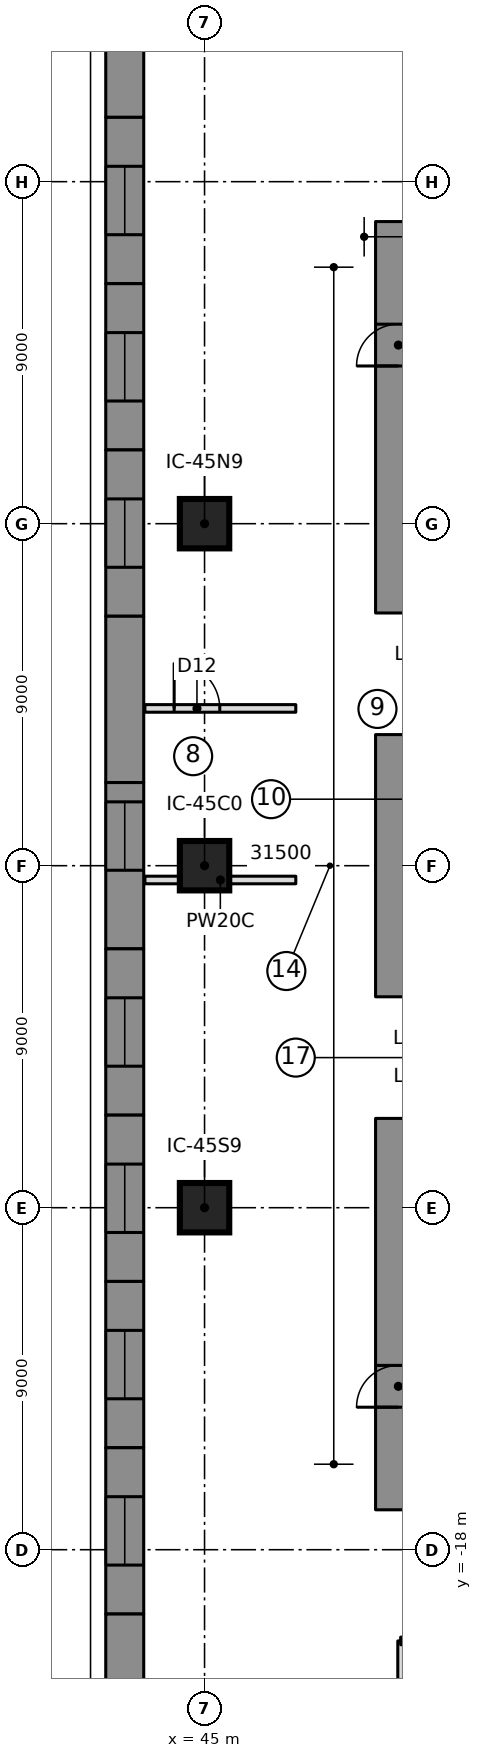
"""IFC4 building model, lengths in metres.
Left out: names, types, materials, properties, quantities, classifications, styles, units other than length and angle.
Written with IfcOpenShell. Run it as: python <this file> out.ifc"""

import sys

from ifc_helpers import new_model, si_unit, direction, frame, frame_2d, origin, origin_2d, place, context, subcontext, project, spatial, polyline, rectangle, outline, extrude, element, fill, save


model = new_model("IFC4")
c1 = context("Model", 3, precision=1e-05, world=origin(), true_north=direction((0.0, 1.0)))
c2 = subcontext(c1, "Body", "Model", "MODEL_VIEW")
j1 = project(units=[si_unit("LENGTHUNIT", "METRE"), si_unit("PLANEANGLEUNIT", "RADIAN")], contexts=[c1])
p1 = place(None, origin())
s1 = spatial("IfcSite", under=j1, at=p1, CompositionType="ELEMENT")
p2 = place(p1, origin())
s2 = spatial("IfcBuilding", under=s1, at=p2, CompositionType="ELEMENT")
p3 = place(p2, frame((0.0, 0.0, 13.5)))
s3 = spatial("IfcBuildingStorey", under=s2, at=p3, CompositionType="ELEMENT", Elevation=13.5)
p4 = place(p3, frame((50.1, 6.65, 0.0), z_axis=(0.0, 0.0, 1.0), x_axis=(0.0, 1.0, 0.0)))
e1 = element("IfcWall", 1, at=p4, inside=s3, PredefinedType="SHEAR", context=c2, shape_type="SweptSolid", body=[
    extrude(rectangle(XDim=10.3, YDim=1.2, at=frame_2d((5.15, 0.0))), origin(), (0.0, 0.0, 1.0), 5.5),
])
p5 = place(p4, frame((6.5, 0.0, 0.0)))
e2 = element("IfcOpeningElement", 2, at=p5, cuts=e1, PredefinedType="OPENING", context=c2, shape_type="SweptSolid", body=[
    extrude(rectangle(XDim=1.1, YDim=2.1, at=frame_2d((0.55, 1.05))), frame((0.0, 0.61, 0.0), z_axis=(0.0, -1.0, 0.0), x_axis=(1.0, 0.0, 0.0)), (0.0, 0.0, 1.0), 1.22),
])
p6 = place(p3, frame((50.1, -3.45, 0.0), z_axis=(0.0, 0.0, 1.0), x_axis=(0.0, 1.0, 0.0)))
e3 = element("IfcWall", 3, at=p6, inside=s3, PredefinedType="SHEAR", context=c2, shape_type="SweptSolid", body=[
    extrude(rectangle(XDim=6.9, YDim=1.2, at=frame_2d((3.45, 0.0))), origin(), (0.0, 0.0, 1.0), 5.5),
])
p7 = place(p3, frame((50.1, -16.95, 0.0), z_axis=(0.0, 0.0, 1.0), x_axis=(0.0, 1.0, 0.0)))
e4 = element("IfcWall", 4, at=p7, inside=s3, PredefinedType="SHEAR", context=c2, shape_type="SweptSolid", body=[
    extrude(rectangle(XDim=10.3, YDim=1.2, at=frame_2d((5.15, 0.0))), origin(), (0.0, 0.0, 1.0), 5.5),
])
p8 = place(p7, frame((2.7, 0.0, 0.0)))
e5 = element("IfcOpeningElement", 5, at=p8, cuts=e4, PredefinedType="OPENING", context=c2, shape_type="SweptSolid", body=[
    extrude(rectangle(XDim=1.1, YDim=2.1, at=frame_2d((0.55, 1.05))), frame((0.0, 0.61, 0.0), z_axis=(0.0, -1.0, 0.0), x_axis=(1.0, 0.0, 0.0)), (0.0, 0.0, 1.0), 1.22),
])
for number, where, z_axis, x_axis in (
    (6, (45.0, -9.0, 0.0), (0.0, 0.0, 1.0), (1.0, 0.0, 0.0)),
    (7, (45.0, 0.0, 0.0), (0.0, 0.0, 1.0), (1.0, 0.0, 0.0)),
    (8, (45.0, 9.0, 0.0), (0.0, 0.0, 1.0), (1.0, 0.0, 0.0)),
):
    element("IfcColumn", number, at=place(p3, frame(where, z_axis=z_axis, x_axis=x_axis)), inside=s3, PredefinedType="COLUMN", context=c2, shape_type="SweptSolid", body=[
        extrude(rectangle(XDim=1.3, YDim=1.3, at=origin_2d()), origin(), (0.0, 0.0, 1.0), 5.5),
    ])
p9 = place(p3, frame((42.9, 24.069, 0.0), z_axis=(0.0, 0.0, 1.0), x_axis=(0.0, -1.0, 0.0)))
e9 = element("IfcWall", 9, at=p9, inside=s3, PredefinedType="NOTDEFINED", context=c2, shape_type="SweptSolid", body=[
    extrude(outline(polyline([(0.0, -0.5), (4.376, -0.5), (4.376, 0.5), (0.0, 0.5), (0.0, -0.5)])), origin(), (0.0, 0.0, 1.0), 5.2),
])
p10 = place(p3, frame((42.9, 19.693, 0.0), z_axis=(0.0, 0.0, 1.0), x_axis=(0.0, -1.0, 0.0)))
e10 = element("IfcWall", 10, at=p10, inside=s3, PredefinedType="NOTDEFINED", context=c2, shape_type="SweptSolid", body=[
    extrude(outline(polyline([(0.0, -0.5), (4.376, -0.5), (4.376, 0.5), (0.0, 0.5), (0.0, -0.5)])), origin(), (0.0, 0.0, 1.0), 5.2),
])
p11 = place(p10, frame((1.288, 0.0, 0.9)))
e11 = element("IfcOpeningElement", 11, at=p11, cuts=e10, PredefinedType="OPENING", context=c2, shape_type="SweptSolid", body=[
    extrude(rectangle(XDim=1.8, YDim=2.4, at=frame_2d((0.9, 1.2))), frame((0.0, 0.51, 0.0), z_axis=(0.0, -1.0, 0.0), x_axis=(1.0, 0.0, 0.0)), (0.0, 0.0, 1.0), 1.02),
])
p12 = place(p3, frame((42.9, 15.316, 0.0), z_axis=(0.0, 0.0, 1.0), x_axis=(0.0, -1.0, 0.0)))
e12 = element("IfcWall", 12, at=p12, inside=s3, PredefinedType="NOTDEFINED", context=c2, shape_type="SweptSolid", body=[
    extrude(outline(polyline([(0.0, -0.5), (4.376, -0.5), (4.376, 0.5), (0.0, 0.5), (0.0, -0.5)])), origin(), (0.0, 0.0, 1.0), 5.2),
])
p13 = place(p12, frame((1.288, 0.0, 0.9)))
e13 = element("IfcOpeningElement", 13, at=p13, cuts=e12, PredefinedType="OPENING", context=c2, shape_type="SweptSolid", body=[
    extrude(rectangle(XDim=1.8, YDim=2.4, at=frame_2d((0.9, 1.2))), frame((0.0, 0.51, 0.0), z_axis=(0.0, -1.0, 0.0), x_axis=(1.0, 0.0, 0.0)), (0.0, 0.0, 1.0), 1.02),
])
p14 = place(p3, frame((42.9, 10.94, 0.0), z_axis=(0.0, 0.0, 1.0), x_axis=(0.0, -1.0, 0.0)))
e14 = element("IfcWall", 14, at=p14, inside=s3, PredefinedType="NOTDEFINED", context=c2, shape_type="SweptSolid", body=[
    extrude(outline(polyline([(0.0, -0.5), (4.376, -0.5), (4.376, 0.5), (0.0, 0.5), (0.0, -0.5)])), origin(), (0.0, 0.0, 1.0), 5.2),
])
p15 = place(p14, frame((1.288, 0.0, 0.9)))
e15 = element("IfcOpeningElement", 15, at=p15, cuts=e14, PredefinedType="OPENING", context=c2, shape_type="SweptSolid", body=[
    extrude(rectangle(XDim=1.8, YDim=2.4, at=frame_2d((0.9, 1.2))), frame((0.0, 0.51, 0.0), z_axis=(0.0, -1.0, 0.0), x_axis=(1.0, 0.0, 0.0)), (0.0, 0.0, 1.0), 1.02),
])
p16 = place(p3, frame((42.9, 6.564, 0.0), z_axis=(0.0, 0.0, 1.0), x_axis=(0.0, -1.0, 0.0)))
e16 = element("IfcWall", 16, at=p16, inside=s3, PredefinedType="NOTDEFINED", context=c2, shape_type="SweptSolid", body=[
    extrude(outline(polyline([(0.0, -0.5), (4.376, -0.5), (4.376, 0.5), (0.0, 0.5), (0.0, -0.5)])), origin(), (0.0, 0.0, 1.0), 5.2),
])
p17 = place(p3, frame((42.9, 2.188, 0.0), z_axis=(0.0, 0.0, 1.0), x_axis=(0.0, -1.0, 0.0)))
e17 = element("IfcWall", 17, at=p17, inside=s3, PredefinedType="NOTDEFINED", context=c2, shape_type="SweptSolid", body=[
    extrude(outline(polyline([(0.0, -0.5), (4.376, -0.5), (4.376, 0.5), (0.0, 0.5), (0.0, -0.5)])), origin(), (0.0, 0.0, 1.0), 5.2),
])
p18 = place(p17, frame((0.508, 0.0, 0.9)))
e18 = element("IfcOpeningElement", 18, at=p18, cuts=e17, PredefinedType="OPENING", context=c2, shape_type="SweptSolid", body=[
    extrude(rectangle(XDim=1.8, YDim=2.4, at=frame_2d((0.9, 1.2))), frame((0.0, 0.51, 0.0), z_axis=(0.0, -1.0, 0.0), x_axis=(1.0, 0.0, 0.0)), (0.0, 0.0, 1.0), 1.02),
])
p19 = place(p3, frame((42.9, -2.188, 0.0), z_axis=(0.0, 0.0, 1.0), x_axis=(0.0, -1.0, 0.0)))
e19 = element("IfcWall", 19, at=p19, inside=s3, PredefinedType="NOTDEFINED", context=c2, shape_type="SweptSolid", body=[
    extrude(outline(polyline([(0.0, -0.5), (4.376, -0.5), (4.376, 0.5), (0.0, 0.5), (0.0, -0.5)])), origin(), (0.0, 0.0, 1.0), 5.2),
])
p20 = place(p19, frame((1.288, 0.0, 0.9)))
e20 = element("IfcOpeningElement", 20, at=p20, cuts=e19, PredefinedType="OPENING", context=c2, shape_type="SweptSolid", body=[
    extrude(rectangle(XDim=1.8, YDim=2.4, at=frame_2d((0.9, 1.2))), frame((0.0, 0.51, 0.0), z_axis=(0.0, -1.0, 0.0), x_axis=(1.0, 0.0, 0.0)), (0.0, 0.0, 1.0), 1.02),
])
p21 = place(p3, frame((42.9, -6.564, 0.0), z_axis=(0.0, 0.0, 1.0), x_axis=(0.0, -1.0, 0.0)))
e21 = element("IfcWall", 21, at=p21, inside=s3, PredefinedType="NOTDEFINED", context=c2, shape_type="SweptSolid", body=[
    extrude(outline(polyline([(0.0, -0.5), (4.376, -0.5), (4.376, 0.5), (0.0, 0.5), (0.0, -0.5)])), origin(), (0.0, 0.0, 1.0), 5.2),
])
p22 = place(p21, frame((1.288, 0.0, 0.9)))
e22 = element("IfcOpeningElement", 22, at=p22, cuts=e21, PredefinedType="OPENING", context=c2, shape_type="SweptSolid", body=[
    extrude(rectangle(XDim=1.8, YDim=2.4, at=frame_2d((0.9, 1.2))), frame((0.0, 0.51, 0.0), z_axis=(0.0, -1.0, 0.0), x_axis=(1.0, 0.0, 0.0)), (0.0, 0.0, 1.0), 1.02),
])
p23 = place(p3, frame((42.9, -10.94, 0.0), z_axis=(0.0, 0.0, 1.0), x_axis=(0.0, -1.0, 0.0)))
e23 = element("IfcWall", 23, at=p23, inside=s3, PredefinedType="NOTDEFINED", context=c2, shape_type="SweptSolid", body=[
    extrude(outline(polyline([(0.0, -0.5), (4.376, -0.5), (4.376, 0.5), (0.0, 0.5), (0.0, -0.5)])), origin(), (0.0, 0.0, 1.0), 5.2),
])
p24 = place(p23, frame((1.288, 0.0, 0.9)))
e24 = element("IfcOpeningElement", 24, at=p24, cuts=e23, PredefinedType="OPENING", context=c2, shape_type="SweptSolid", body=[
    extrude(rectangle(XDim=1.8, YDim=2.4, at=frame_2d((0.9, 1.2))), frame((0.0, 0.51, 0.0), z_axis=(0.0, -1.0, 0.0), x_axis=(1.0, 0.0, 0.0)), (0.0, 0.0, 1.0), 1.02),
])
p25 = place(p3, frame((42.9, -15.316, 0.0), z_axis=(0.0, 0.0, 1.0), x_axis=(0.0, -1.0, 0.0)))
e25 = element("IfcWall", 25, at=p25, inside=s3, PredefinedType="NOTDEFINED", context=c2, shape_type="SweptSolid", body=[
    extrude(outline(polyline([(0.0, -0.5), (4.376, -0.5), (4.376, 0.5), (0.0, 0.5), (0.0, -0.5)])), origin(), (0.0, 0.0, 1.0), 5.2),
])
p26 = place(p25, frame((1.288, 0.0, 0.9)))
e26 = element("IfcOpeningElement", 26, at=p26, cuts=e25, PredefinedType="OPENING", context=c2, shape_type="SweptSolid", body=[
    extrude(rectangle(XDim=1.8, YDim=2.4, at=frame_2d((0.9, 1.2))), frame((0.0, 0.51, 0.0), z_axis=(0.0, -1.0, 0.0), x_axis=(1.0, 0.0, 0.0)), (0.0, 0.0, 1.0), 1.02),
])
p27 = place(p3, frame((42.9, -19.693, 0.0), z_axis=(0.0, 0.0, 1.0), x_axis=(0.0, -1.0, 0.0)))
e27 = element("IfcWall", 27, at=p27, inside=s3, PredefinedType="NOTDEFINED", context=c2, shape_type="SweptSolid", body=[
    extrude(outline(polyline([(0.0, -0.5), (4.376, -0.5), (4.376, 0.5), (0.0, 0.5), (0.0, -0.5)])), origin(), (0.0, 0.0, 1.0), 5.2),
])
p28 = place(p3, frame((43.43, -0.376, 0.0), z_axis=(0.0, 0.0, 1.0), x_axis=(1.0, 0.0, 0.0)))
e28 = element("IfcWall", 28, at=p28, inside=s3, PredefinedType="PARTITIONING", context=c2, shape_type="SweptSolid", body=[
    extrude(rectangle(XDim=3.971, YDim=0.2, at=frame_2d((1.985, 0.0))), origin(), (0.0, 0.0, 1.0), 5.15),
])
p29 = place(p3, frame((50.16, -36.6, 0.0), z_axis=(0.0, 0.0, 1.0), x_axis=(0.0, 1.0, 0.0)))
e29 = element("IfcWall", 29, at=p29, inside=s3, PredefinedType="PARTITIONING", context=c2, shape_type="SweptSolid", body=[
    extrude(rectangle(XDim=16.2, YDim=0.15, at=frame_2d((8.1, 0.0))), origin(), (0.0, 0.0, 1.0), 5.15),
])
p30 = place(p3, frame((43.43, 4.139, 0.0), z_axis=(0.0, 0.0, 1.0), x_axis=(1.0, 0.0, 0.0)))
e30 = element("IfcWall", 30, at=p30, inside=s3, PredefinedType="PARTITIONING", context=c2, shape_type="SweptSolid", body=[
    extrude(rectangle(XDim=3.971, YDim=0.2, at=frame_2d((1.985, 0.0))), origin(), (0.0, 0.0, 1.0), 5.15),
])
p31 = place(p30, frame((0.771, 0.0, 0.0)))
e31 = element("IfcOpeningElement", 31, at=p31, cuts=e30, PredefinedType="OPENING", context=c2, shape_type="SweptSolid", body=[
    extrude(rectangle(XDim=1.2, YDim=2.1, at=frame_2d((0.6, 1.05))), frame((0.0, 0.11, 0.0), z_axis=(0.0, -1.0, 0.0), x_axis=(1.0, 0.0, 0.0)), (0.0, 0.0, 1.0), 0.22),
])
p32 = place(p3, frame((50.16, -20.4, 0.0), z_axis=(0.0, 0.0, 1.0), x_axis=(1.0, 0.0, 0.0)))
e32 = element("IfcWall", 32, at=p32, inside=s3, PredefinedType="PARTITIONING", context=c2, shape_type="SweptSolid", body=[
    extrude(rectangle(XDim=6.12, YDim=0.2, at=frame_2d((3.06, 0.0))), origin(), (0.0, 0.0, 1.0), 5.15),
])
p33 = place(p32, frame((2.56, 0.0, 0.0)))
e33 = element("IfcOpeningElement", 33, at=p33, cuts=e32, PredefinedType="OPENING", context=c2, shape_type="SweptSolid", body=[
    extrude(rectangle(XDim=2.0, YDim=2.4, at=frame_2d((1.0, 1.2))), frame((0.0, 0.11, 0.0), z_axis=(0.0, -1.0, 0.0), x_axis=(1.0, 0.0, 0.0)), (0.0, 0.0, 1.0), 0.22),
])
p34 = place(p11, origin())
e34 = element("IfcWindow", 34, at=p34, inside=s3, PartitioningType="SINGLE_PANEL", PredefinedType="WINDOW", context=c2, shape_type="SweptSolid", body=[
    extrude(rectangle(XDim=1.8, YDim=2.4, at=frame_2d((0.9, 1.2))), frame((0.0, 0.5, 0.0), z_axis=(0.0, -1.0, 0.0), x_axis=(1.0, 0.0, 0.0)), (0.0, 0.0, 1.0), 0.06),
])
fill(e11, e34)
p35 = place(p13, origin())
e35 = element("IfcWindow", 35, at=p35, inside=s3, PartitioningType="SINGLE_PANEL", PredefinedType="WINDOW", context=c2, shape_type="SweptSolid", body=[
    extrude(rectangle(XDim=1.8, YDim=2.4, at=frame_2d((0.9, 1.2))), frame((0.0, 0.5, 0.0), z_axis=(0.0, -1.0, 0.0), x_axis=(1.0, 0.0, 0.0)), (0.0, 0.0, 1.0), 0.06),
])
fill(e13, e35)
p36 = place(p15, origin())
e36 = element("IfcWindow", 36, at=p36, inside=s3, PartitioningType="SINGLE_PANEL", PredefinedType="WINDOW", context=c2, shape_type="SweptSolid", body=[
    extrude(rectangle(XDim=1.8, YDim=2.4, at=frame_2d((0.9, 1.2))), frame((0.0, 0.5, 0.0), z_axis=(0.0, -1.0, 0.0), x_axis=(1.0, 0.0, 0.0)), (0.0, 0.0, 1.0), 0.06),
])
fill(e15, e36)
p37 = place(p18, origin())
e37 = element("IfcWindow", 37, at=p37, inside=s3, PartitioningType="SINGLE_PANEL", PredefinedType="WINDOW", context=c2, shape_type="SweptSolid", body=[
    extrude(rectangle(XDim=1.8, YDim=2.4, at=frame_2d((0.9, 1.2))), frame((0.0, 0.5, 0.0), z_axis=(0.0, -1.0, 0.0), x_axis=(1.0, 0.0, 0.0)), (0.0, 0.0, 1.0), 0.06),
])
fill(e18, e37)
p38 = place(p20, origin())
e38 = element("IfcWindow", 38, at=p38, inside=s3, PartitioningType="SINGLE_PANEL", PredefinedType="WINDOW", context=c2, shape_type="SweptSolid", body=[
    extrude(rectangle(XDim=1.8, YDim=2.4, at=frame_2d((0.9, 1.2))), frame((0.0, 0.5, 0.0), z_axis=(0.0, -1.0, 0.0), x_axis=(1.0, 0.0, 0.0)), (0.0, 0.0, 1.0), 0.06),
])
fill(e20, e38)
p39 = place(p22, origin())
e39 = element("IfcWindow", 39, at=p39, inside=s3, PartitioningType="SINGLE_PANEL", PredefinedType="WINDOW", context=c2, shape_type="SweptSolid", body=[
    extrude(rectangle(XDim=1.8, YDim=2.4, at=frame_2d((0.9, 1.2))), frame((0.0, 0.5, 0.0), z_axis=(0.0, -1.0, 0.0), x_axis=(1.0, 0.0, 0.0)), (0.0, 0.0, 1.0), 0.06),
])
fill(e22, e39)
p40 = place(p24, origin())
e40 = element("IfcWindow", 40, at=p40, inside=s3, PartitioningType="SINGLE_PANEL", PredefinedType="WINDOW", context=c2, shape_type="SweptSolid", body=[
    extrude(rectangle(XDim=1.8, YDim=2.4, at=frame_2d((0.9, 1.2))), frame((0.0, 0.5, 0.0), z_axis=(0.0, -1.0, 0.0), x_axis=(1.0, 0.0, 0.0)), (0.0, 0.0, 1.0), 0.06),
])
fill(e24, e40)
p41 = place(p26, origin())
e41 = element("IfcWindow", 41, at=p41, inside=s3, PartitioningType="SINGLE_PANEL", PredefinedType="WINDOW", context=c2, shape_type="SweptSolid", body=[
    extrude(rectangle(XDim=1.8, YDim=2.4, at=frame_2d((0.9, 1.2))), frame((0.0, 0.5, 0.0), z_axis=(0.0, -1.0, 0.0), x_axis=(1.0, 0.0, 0.0)), (0.0, 0.0, 1.0), 0.06),
])
fill(e26, e41)
p42 = place(p31, origin())
e42 = element("IfcDoor", 42, at=p42, inside=s3, OperationType="SINGLE_SWING_RIGHT", PredefinedType="DOOR", context=c2, shape_type="SweptSolid", body=[
    extrude(rectangle(XDim=1.2, YDim=2.1, at=frame_2d((0.6, 1.05))), frame((0.0, 0.025, 0.0), z_axis=(0.0, -1.0, 0.0), x_axis=(1.0, 0.0, 0.0)), (0.0, 0.0, 1.0), 0.05),
])
fill(e31, e42)
p43 = place(p5, origin())
e43 = element("IfcDoor", 43, at=p43, inside=s3, OperationType="SINGLE_SWING_RIGHT", PredefinedType="DOOR", context=c2, shape_type="SweptSolid", body=[
    extrude(rectangle(XDim=1.1, YDim=2.1, at=frame_2d((0.55, 1.05))), frame((0.0, 0.025, 0.0), z_axis=(0.0, -1.0, 0.0), x_axis=(1.0, 0.0, 0.0)), (0.0, 0.0, 1.0), 0.05),
])
fill(e2, e43)
p44 = place(p8, origin())
e44 = element("IfcDoor", 44, at=p44, inside=s3, OperationType="SINGLE_SWING_RIGHT", PredefinedType="DOOR", context=c2, shape_type="SweptSolid", body=[
    extrude(rectangle(XDim=1.1, YDim=2.1, at=frame_2d((0.55, 1.05))), frame((0.0, 0.025, 0.0), z_axis=(0.0, -1.0, 0.0), x_axis=(1.0, 0.0, 0.0)), (0.0, 0.0, 1.0), 0.05),
])
fill(e5, e44)
save(model, sys.argv[1])
